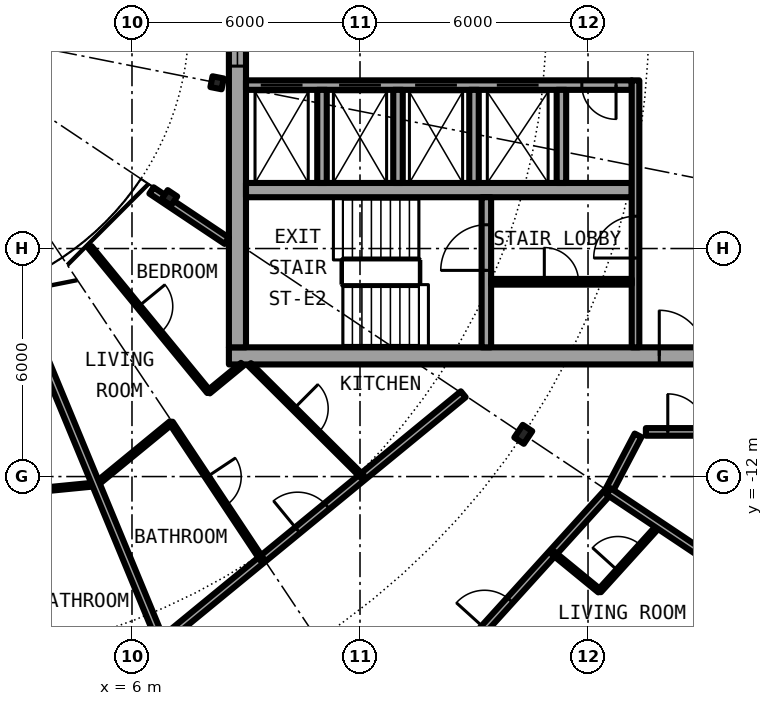
"""IFC4 building model, lengths in metres.
Left out: names, types, materials, properties, quantities, classifications, styles, units other than length and angle.
Written with IfcOpenShell. Run it as: python <this file> out.ifc"""

import sys

from ifc_helpers import new_model, si_unit, direction, frame, frame_2d, origin, origin_2d, place, context, subcontext, project, spatial, rectangle, i_section, extrude, element, fill, save


model = new_model("IFC4")
c1 = context("Model", 3, precision=1e-05, world=origin(), true_north=direction((0.0, 1.0)))
c2 = subcontext(c1, "Body", "Model", "MODEL_VIEW")
j1 = project(units=[si_unit("LENGTHUNIT", "METRE"), si_unit("PLANEANGLEUNIT", "RADIAN")], contexts=[c1])
p1 = place(None, origin())
s1 = spatial("IfcSite", under=j1, at=p1, CompositionType="ELEMENT")
p2 = place(p1, origin())
s2 = spatial("IfcBuilding", under=s1, at=p2, CompositionType="ELEMENT")
p3 = place(p2, frame((0.0, 0.0, 212.7)))
s3 = spatial("IfcBuildingStorey", under=s2, at=p3, CompositionType="ELEMENT", Elevation=212.7)
p4 = place(p3, frame((16.297, -10.889, 0.0), z_axis=(0.0, 0.0, 1.0), x_axis=(0.831469612303, -0.55557023302, 0.0)))
e1 = element("IfcColumn", 1, at=p4, inside=s3, PredefinedType="COLUMN", context=c2, shape_type="SweptSolid", body=[
    extrude(i_section(OverallWidth=0.3, OverallDepth=0.4, WebThickness=0.013, FlangeThickness=0.024, FilletRadius=0.027, at=origin_2d()), origin(), (0.0, 0.0, 1.0), 3.05),
])
for number, where, z_axis, x_axis in (
    (2, (6.984, -4.667, 0.0), (0.0, 0.0, 1.0), (0.831, -0.556, 0.0)),
    (3, (8.239, -1.639, 0.0), (0.0, 0.0, 1.0), (0.981, -0.195, 0.0)),
):
    element("IfcColumn", number, at=place(p3, frame(where, z_axis=z_axis, x_axis=x_axis)), inside=s3, PredefinedType="COLUMN", context=c2, shape_type="SweptSolid", body=[
        extrude(i_section(OverallWidth=0.3, OverallDepth=0.29, WebThickness=0.009, FlangeThickness=0.014, FilletRadius=0.027, at=origin_2d()), origin(), (0.0, 0.0, 1.0), 3.05),
    ])
p5 = place(p3, frame((19.304, -19.304, 0.0), z_axis=(0.0, 0.0, 1.0), x_axis=(0.634382322723, 0.773019449054, 0.0)))
e4 = element("IfcWall", 4, at=p5, inside=s3, PredefinedType="SOLIDWALL", context=c2, shape_type="SweptSolid", body=[
    extrude(rectangle(XDim=5.352, YDim=0.25, at=frame_2d((2.676, 0.0))), origin(), (0.0, 0.0, 1.0), 2.7),
])
p6 = place(p5, frame((0.841, 0.0, 0.0)))
e5 = element("IfcOpeningElement", 5, at=p6, cuts=e4, PredefinedType="OPENING", context=c2, shape_type="SweptSolid", body=[
    extrude(rectangle(XDim=1.0, YDim=2.2, at=frame_2d((0.5, 1.1))), frame((0.0, 0.135, 0.0), z_axis=(0.0, -1.0, 0.0), x_axis=(1.0, 0.0, 0.0)), (0.0, 0.0, 1.0), 0.27),
])
p7 = place(p5, frame((3.111, 0.0, 0.3)))
e6 = element("IfcOpeningElement", 6, at=p7, cuts=e4, PredefinedType="OPENING", context=c2, shape_type="SweptSolid", body=[
    extrude(rectangle(XDim=1.8, YDim=2.1, at=frame_2d((0.9, 1.05))), frame((0.0, 0.135, 0.0), z_axis=(0.0, -1.0, 0.0), x_axis=(1.0, 0.0, 0.0)), (0.0, 0.0, 1.0), 0.27),
])
p8 = place(p3, frame((8.55, -8.825, 0.0), z_axis=(0.0, 0.0, 1.0), x_axis=(1.0, 0.0, 0.0)))
e7 = element("IfcWall", 7, at=p8, inside=s3, PredefinedType="SHEAR", context=c2, shape_type="SweptSolid", body=[
    extrude(rectangle(XDim=13.5, YDim=0.45, at=frame_2d((6.75, 0.0))), origin(), (0.0, 0.0, 1.0), 3.05),
])
p9 = place(p8, frame((11.325, 0.0, 0.0)))
e8 = element("IfcOpeningElement", 8, at=p9, cuts=e7, PredefinedType="OPENING", context=c2, shape_type="SweptSolid", body=[
    extrude(rectangle(XDim=1.2, YDim=2.3, at=frame_2d((0.6, 1.15))), frame((0.0, 0.235, 0.0), z_axis=(0.0, -1.0, 0.0), x_axis=(1.0, 0.0, 0.0)), (0.0, 0.0, 1.0), 0.47),
])
p10 = place(p3, frame((8.775, -8.6, 0.0), z_axis=(0.0, 0.0, 1.0), x_axis=(0.0, 1.0, 0.0)))
e9 = element("IfcWall", 9, at=p10, inside=s3, PredefinedType="SHEAR", context=c2, shape_type="SweptSolid", body=[
    extrude(rectangle(XDim=17.2, YDim=0.45, at=frame_2d((8.6, 0.0))), origin(), (0.0, 0.0, 1.0), 3.05),
])
p11 = place(p10, frame((7.4, 0.0, 0.1)))
e10 = element("IfcOpeningElement", 10, at=p11, cuts=e9, PredefinedType="OPENING", context=c2, shape_type="SweptSolid", body=[
    extrude(rectangle(XDim=2.4, YDim=2.2, at=frame_2d((1.2, 1.1))), frame((0.0, 0.235, 0.0), z_axis=(0.0, -1.0, 0.0), x_axis=(1.0, 0.0, 0.0)), (0.0, 0.0, 1.0), 0.47),
])
p12 = place(p3, frame((19.15, -1.7, 0.0), z_axis=(0.0, 0.0, 1.0), x_axis=(-1.0, 0.0, 0.0)))
e11 = element("IfcWall", 11, at=p12, inside=s3, PredefinedType="SHEAR", context=c2, shape_type="SweptSolid", body=[
    extrude(rectangle(XDim=10.15, YDim=0.25, at=frame_2d((5.075, 0.0))), origin(), (0.0, 0.0, 1.0), 3.05),
])
p13 = place(p12, frame((8.663, 0.0, 0.0)))
e12 = element("IfcOpeningElement", 12, at=p13, cuts=e11, PredefinedType="OPENING", context=c2, shape_type="SweptSolid", body=[
    extrude(rectangle(XDim=1.1, YDim=2.3, at=frame_2d((0.55, 1.15))), frame((0.0, 0.135, 0.0), z_axis=(0.0, -1.0, 0.0), x_axis=(1.0, 0.0, 0.0)), (0.0, 0.0, 1.0), 0.27),
])
p14 = place(p12, frame((6.6, 0.0, 0.0)))
e13 = element("IfcOpeningElement", 13, at=p14, cuts=e11, PredefinedType="OPENING", context=c2, shape_type="SweptSolid", body=[
    extrude(rectangle(XDim=1.1, YDim=2.3, at=frame_2d((0.55, 1.15))), frame((0.0, 0.135, 0.0), z_axis=(0.0, -1.0, 0.0), x_axis=(1.0, 0.0, 0.0)), (0.0, 0.0, 1.0), 0.27),
])
p15 = place(p12, frame((4.6, 0.0, 0.0)))
e14 = element("IfcOpeningElement", 14, at=p15, cuts=e11, PredefinedType="OPENING", context=c2, shape_type="SweptSolid", body=[
    extrude(rectangle(XDim=1.1, YDim=2.3, at=frame_2d((0.55, 1.15))), frame((0.0, 0.135, 0.0), z_axis=(0.0, -1.0, 0.0), x_axis=(1.0, 0.0, 0.0)), (0.0, 0.0, 1.0), 0.27),
])
p16 = place(p12, frame((2.45, 0.0, 0.0)))
e15 = element("IfcOpeningElement", 15, at=p16, cuts=e11, PredefinedType="OPENING", context=c2, shape_type="SweptSolid", body=[
    extrude(rectangle(XDim=1.1, YDim=2.3, at=frame_2d((0.55, 1.15))), frame((0.0, 0.135, 0.0), z_axis=(0.0, -1.0, 0.0), x_axis=(1.0, 0.0, 0.0)), (0.0, 0.0, 1.0), 0.27),
])
p17 = place(p12, frame((0.413, 0.0, 0.0)))
e16 = element("IfcOpeningElement", 16, at=p17, cuts=e11, PredefinedType="OPENING", context=c2, shape_type="SweptSolid", body=[
    extrude(rectangle(XDim=0.9, YDim=2.3, at=frame_2d((0.45, 1.15))), frame((0.0, 0.135, 0.0), z_axis=(0.0, -1.0, 0.0), x_axis=(1.0, 0.0, 0.0)), (0.0, 0.0, 1.0), 0.27),
])
p18 = place(p3, frame((9.0, -4.462, 0.0), z_axis=(0.0, 0.0, 1.0), x_axis=(1.0, 0.0, 0.0)))
e17 = element("IfcWall", 17, at=p18, inside=s3, PredefinedType="SHEAR", context=c2, shape_type="SweptSolid", body=[
    extrude(rectangle(XDim=10.15, YDim=0.375, at=frame_2d((5.075, 0.0))), origin(), (0.0, 0.0, 1.0), 3.05),
])
p19 = place(p3, frame((15.325, -8.6, 0.0), z_axis=(0.0, 0.0, 1.0), x_axis=(0.0, 1.0, 0.0)))
e18 = element("IfcWall", 18, at=p19, inside=s3, PredefinedType="SHEAR", context=c2, shape_type="SweptSolid", body=[
    extrude(rectangle(XDim=3.95, YDim=0.25, at=frame_2d((1.975, 0.0))), origin(), (0.0, 0.0, 1.0), 3.05),
])
p20 = place(p19, frame((2.025, 0.0, 0.0)))
e19 = element("IfcOpeningElement", 19, at=p20, cuts=e18, PredefinedType="OPENING", context=c2, shape_type="SweptSolid", body=[
    extrude(rectangle(XDim=1.2, YDim=2.3, at=frame_2d((0.6, 1.15))), frame((0.0, 0.135, 0.0), z_axis=(0.0, -1.0, 0.0), x_axis=(1.0, 0.0, 0.0)), (0.0, 0.0, 1.0), 0.27),
])
for number, where, z_axis, x_axis in (
    (20, (15.0, -1.825, 0.0), (0.0, 0.0, 1.0), (0.0, -1.0, 0.0)),
    (21, (17.3, -1.825, 0.0), (0.0, 0.0, 1.0), (0.0, -1.0, 0.0)),
):
    element("IfcWall", number, at=place(p3, frame(where, z_axis=z_axis, x_axis=x_axis)), inside=s3, PredefinedType="SOLIDWALL", context=c2, shape_type="SweptSolid", body=[
        extrude(rectangle(XDim=2.45, YDim=0.25, at=frame_2d((1.225, 0.0))), origin(), (0.0, 0.0, 1.0), 2.7),
    ])
p21 = place(p3, frame((19.25, -8.6, 0.0), z_axis=(0.0, 0.0, 1.0), x_axis=(0.0, 1.0, 0.0)))
e22 = element("IfcWall", 22, at=p21, inside=s3, PredefinedType="SOLIDWALL", context=c2, shape_type="SweptSolid", body=[
    extrude(rectangle(XDim=7.025, YDim=0.2, at=frame_2d((3.513, 0.0))), origin(), (0.0, 0.0, 1.0), 2.7),
])
p22 = place(p21, frame((2.35, 0.0, 0.0)))
e23 = element("IfcOpeningElement", 23, at=p22, cuts=e22, PredefinedType="OPENING", context=c2, shape_type="SweptSolid", body=[
    extrude(rectangle(XDim=1.1, YDim=2.3, at=frame_2d((0.55, 1.15))), frame((0.0, 0.11, 0.0), z_axis=(0.0, -1.0, 0.0), x_axis=(1.0, 0.0, 0.0)), (0.0, 0.0, 1.0), 0.22),
])
for number, where, z_axis, x_axis in (
    (24, (11.0, -1.825, 0.0), (0.0, 0.0, 1.0), (0.0, -1.0, 0.0)),
    (25, (13.0, -1.825, 0.0), (0.0, 0.0, 1.0), (0.0, -1.0, 0.0)),
):
    element("IfcWall", number, at=place(p3, frame(where, z_axis=z_axis, x_axis=x_axis)), inside=s3, PredefinedType="SOLIDWALL", context=c2, shape_type="SweptSolid", body=[
        extrude(rectangle(XDim=2.45, YDim=0.25, at=frame_2d((1.225, 0.0))), origin(), (0.0, 0.0, 1.0), 2.7),
    ])
p23 = place(p3, frame((15.45, -6.875, 0.0), z_axis=(0.0, 0.0, 1.0), x_axis=(1.0, 0.0, 0.0)))
e26 = element("IfcWall", 26, at=p23, inside=s3, PredefinedType="PARTITIONING", context=c2, shape_type="SweptSolid", body=[
    extrude(rectangle(XDim=3.7, YDim=0.15, at=frame_2d((1.85, 0.0))), origin(), (0.0, 0.0, 1.0), 2.7),
])
p24 = place(p23, frame((1.4, 0.0, 0.0)))
e27 = element("IfcOpeningElement", 27, at=p24, cuts=e26, PredefinedType="OPENING", context=c2, shape_type="SweptSolid", body=[
    extrude(rectangle(XDim=0.9, YDim=2.3, at=frame_2d((0.45, 1.15))), frame((0.0, 0.085, 0.0), z_axis=(0.0, -1.0, 0.0), x_axis=(1.0, 0.0, 0.0)), (0.0, 0.0, 1.0), 0.17),
])
p25 = place(p3, frame((18.302, -15.01, 0.0), z_axis=(0.0, 0.0, 1.0), x_axis=(0.671637685376, 0.740879760544, 0.0)))
e28 = element("IfcWall", 28, at=p25, inside=s3, PredefinedType="PARTITIONING", context=c2, shape_type="SweptSolid", body=[
    extrude(rectangle(XDim=2.338, YDim=0.1, at=frame_2d((1.169, 0.0))), origin(), (0.0, 0.0, 1.0), 2.7),
])
p26 = place(p25, frame((0.719, 0.0, 0.0)))
e29 = element("IfcOpeningElement", 29, at=p26, cuts=e28, PredefinedType="OPENING", context=c2, shape_type="SweptSolid", body=[
    extrude(rectangle(XDim=0.9, YDim=2.3, at=frame_2d((0.45, 1.15))), frame((0.0, 0.06, 0.0), z_axis=(0.0, -1.0, 0.0), x_axis=(1.0, 0.0, 0.0)), (0.0, 0.0, 1.0), 0.12),
])
p27 = place(p3, frame((18.542, -12.389, 0.0), z_axis=(0.0, 0.0, 1.0), x_axis=(0.465359652486, 0.885121683068, 0.0)))
e30 = element("IfcWall", 30, at=p27, inside=s3, PredefinedType="PARTITIONING", context=c2, shape_type="SweptSolid", body=[
    extrude(rectangle(XDim=1.665, YDim=0.2, at=frame_2d((0.833, 0.0))), origin(), (0.0, 0.0, 1.0), 2.7),
])
p28 = place(p3, frame((14.147, -17.238, 0.0), z_axis=(0.0, 0.0, 1.0), x_axis=(0.671561669125, 0.740948665268, 0.0)))
e31 = element("IfcWall", 31, at=p28, inside=s3, PredefinedType="PARTITIONING", context=c2, shape_type="SweptSolid", body=[
    extrude(rectangle(XDim=6.544, YDim=0.2, at=frame_2d((3.272, 0.0))), origin(), (0.0, 0.0, 1.0), 2.7),
])
p29 = place(p28, frame((1.682, 0.0, 0.0)))
e32 = element("IfcOpeningElement", 32, at=p29, cuts=e31, PredefinedType="OPENING", context=c2, shape_type="SweptSolid", body=[
    extrude(rectangle(XDim=1.0, YDim=2.3, at=frame_2d((0.5, 1.15))), frame((0.0, 0.11, 0.0), z_axis=(0.0, -1.0, 0.0), x_axis=(1.0, 0.0, 0.0)), (0.0, 0.0, 1.0), 0.22),
])
p30 = place(p3, frame((6.773, -16.353, 0.0), z_axis=(0.0, 0.0, 1.0), x_axis=(0.773034536097, 0.634363938131, 0.0)))
e33 = element("IfcWall", 33, at=p30, inside=s3, PredefinedType="PARTITIONING", context=c2, shape_type="SweptSolid", body=[
    extrude(rectangle(XDim=10.277, YDim=0.2, at=frame_2d((5.138, 0.0))), origin(), (0.0, 0.0, 1.0), 2.7),
])
p31 = place(p30, frame((4.638, 0.0, 0.0)))
e34 = element("IfcOpeningElement", 34, at=p31, cuts=e33, PredefinedType="OPENING", context=c2, shape_type="SweptSolid", body=[
    extrude(rectangle(XDim=1.0, YDim=2.3, at=frame_2d((0.5, 1.15))), frame((0.0, 0.11, 0.0), z_axis=(0.0, -1.0, 0.0), x_axis=(1.0, 0.0, 0.0)), (0.0, 0.0, 1.0), 0.22),
])
p32 = place(p3, frame((2.511, -12.455, 0.0), z_axis=(0.0, 0.0, 1.0), x_axis=(0.995205948766, 0.09780142913, 0.0)))
e35 = element("IfcWall", 35, at=p32, inside=s3, PredefinedType="PARTITIONING", context=c2, shape_type="SweptSolid", body=[
    extrude(rectangle(XDim=2.556, YDim=0.1, at=frame_2d((1.278, 0.0))), origin(), (0.0, 0.0, 1.0), 2.7),
])
p33 = place(p3, frame((5.055, -12.204, 0.0), z_axis=(0.0, 0.0, 1.0), x_axis=(0.772943675046, 0.634474645046, 0.0)))
e36 = element("IfcWall", 36, at=p33, inside=s3, PredefinedType="PARTITIONING", context=c2, shape_type="SweptSolid", body=[
    extrude(rectangle(XDim=2.557, YDim=0.1, at=frame_2d((1.278, 0.0))), origin(), (0.0, 0.0, 1.0), 2.7),
])
p34 = place(p3, frame((8.017, -9.773, 0.0), z_axis=(0.0, 0.0, 1.0), x_axis=(0.772786083133, 0.634666581534, 0.0)))
e37 = element("IfcWall", 37, at=p34, inside=s3, PredefinedType="PARTITIONING", context=c2, shape_type="SweptSolid", body=[
    extrude(rectangle(XDim=1.144, YDim=0.1, at=frame_2d((0.572, 0.0))), origin(), (0.0, 0.0, 1.0), 2.7),
])
p35 = place(p3, frame((19.523, -10.825, 0.0), z_axis=(0.0, 0.0, 1.0), x_axis=(1.0, 0.0, 0.0)))
e38 = element("IfcWall", 38, at=p35, inside=s3, PredefinedType="PARTITIONING", context=c2, shape_type="SweptSolid", body=[
    extrude(rectangle(XDim=2.152, YDim=0.2, at=frame_2d((1.076, 0.0))), origin(), (0.0, 0.0, 1.0), 2.7),
])
p36 = place(p35, frame((0.576, 0.0, 0.0)))
e39 = element("IfcOpeningElement", 39, at=p36, cuts=e38, PredefinedType="OPENING", context=c2, shape_type="SweptSolid", body=[
    extrude(rectangle(XDim=1.0, YDim=2.3, at=frame_2d((0.5, 1.15))), frame((0.0, 0.11, 0.0), z_axis=(0.0, -1.0, 0.0), x_axis=(1.0, 0.0, 0.0)), (0.0, 0.0, 1.0), 0.22),
])
p37 = place(p3, frame((6.513, -4.472, 0.0), z_axis=(0.0, 0.0, 1.0), x_axis=(0.831403409976, -0.555669299026, 0.0)))
e40 = element("IfcWall", 40, at=p37, inside=s3, PredefinedType="PARTITIONING", context=c2, shape_type="SweptSolid", body=[
    extrude(rectangle(XDim=2.383, YDim=0.2, at=frame_2d((1.191, 0.0))), origin(), (0.0, 0.0, 1.0), 2.7),
])
p38 = place(p3, frame((17.077, -14.006, 0.0), z_axis=(0.0, 0.0, 1.0), x_axis=(0.773476341377, -0.633825172528, 0.0)))
e41 = element("IfcWall", 41, at=p38, inside=s3, PredefinedType="PARTITIONING", context=c2, shape_type="SweptSolid", body=[
    extrude(rectangle(XDim=1.584, YDim=0.1, at=frame_2d((0.792, 0.0))), origin(), (0.0, 0.0, 1.0), 2.7),
])
p39 = place(p3, frame((2.952, -7.133, 0.0), z_axis=(0.0, 0.0, 1.0), x_axis=(0.382570007985, -0.923926506271, 0.0)))
e42 = element("IfcWall", 42, at=p39, inside=s3, PredefinedType="PARTITIONING", context=c2, shape_type="SweptSolid", body=[
    extrude(rectangle(XDim=9.98, YDim=0.2, at=frame_2d((4.99, 0.0))), origin(), (0.0, 0.0, 1.0), 2.7),
])
p40 = place(p3, frame((4.898, -5.968, 0.0), z_axis=(0.0, 0.0, 1.0), x_axis=(0.634401778971, -0.773003481776, 0.0)))
e43 = element("IfcWall", 43, at=p40, inside=s3, PredefinedType="PARTITIONING", context=c2, shape_type="SweptSolid", body=[
    extrude(rectangle(XDim=4.92, YDim=0.1, at=frame_2d((2.46, 0.0))), origin(), (0.0, 0.0, 1.0), 2.7),
])
p41 = place(p40, frame((2.01, 0.0, 0.0)))
e44 = element("IfcOpeningElement", 44, at=p41, cuts=e43, PredefinedType="OPENING", context=c2, shape_type="SweptSolid", body=[
    extrude(rectangle(XDim=0.9, YDim=2.3, at=frame_2d((0.45, 1.15))), frame((0.0, 0.06, 0.0), z_axis=(0.0, -1.0, 0.0), x_axis=(1.0, 0.0, 0.0)), (0.0, 0.0, 1.0), 0.12),
])
p42 = place(p3, frame((7.028, -10.584, 0.0), z_axis=(0.0, 0.0, 1.0), x_axis=(0.553303732327, -0.832979579457, 0.0)))
e45 = element("IfcWall", 45, at=p42, inside=s3, PredefinedType="PARTITIONING", context=c2, shape_type="SweptSolid", body=[
    extrude(rectangle(XDim=4.319, YDim=0.1, at=frame_2d((2.16, 0.0))), origin(), (0.0, 0.0, 1.0), 2.7),
])
p43 = place(p42, frame((1.71, 0.0, 0.0)))
e46 = element("IfcOpeningElement", 46, at=p43, cuts=e45, PredefinedType="OPENING", context=c2, shape_type="SweptSolid", body=[
    extrude(rectangle(XDim=0.9, YDim=2.3, at=frame_2d((0.45, 1.15))), frame((0.0, 0.06, 0.0), z_axis=(0.0, -1.0, 0.0), x_axis=(1.0, 0.0, 0.0)), (0.0, 0.0, 1.0), 0.12),
])
p44 = place(p3, frame((9.096, -9.051, 0.0), z_axis=(0.0, 0.0, 1.0), x_axis=(0.708909651863, -0.705299302067, 0.0)))
e47 = element("IfcWall", 47, at=p44, inside=s3, PredefinedType="PARTITIONING", context=c2, shape_type="SweptSolid", body=[
    extrude(rectangle(XDim=4.193, YDim=0.1, at=frame_2d((2.096, 0.0))), origin(), (0.0, 0.0, 1.0), 2.7),
])
p45 = place(p44, frame((1.646, 0.0, 0.0)))
e48 = element("IfcOpeningElement", 48, at=p45, cuts=e47, PredefinedType="OPENING", context=c2, shape_type="SweptSolid", body=[
    extrude(rectangle(XDim=0.9, YDim=2.3, at=frame_2d((0.45, 1.15))), frame((0.0, 0.06, 0.0), z_axis=(0.0, -1.0, 0.0), x_axis=(1.0, 0.0, 0.0)), (0.0, 0.0, 1.0), 0.12),
])
p46 = place(p3, frame((18.542, -12.389, 0.0), z_axis=(0.0, 0.0, 1.0), x_axis=(0.831387096605, -0.55569370664, 0.0)))
e49 = element("IfcWall", 49, at=p46, inside=s3, PredefinedType="PARTITIONING", context=c2, shape_type="SweptSolid", body=[
    extrude(rectangle(XDim=4.875, YDim=0.2, at=frame_2d((2.438, 0.0))), origin(), (0.0, 0.0, 1.0), 2.7),
])
p47 = place(p13, origin())
e50 = element("IfcDoor", 50, at=p47, inside=s3, OperationType="DOUBLE_DOOR_SLIDING", PredefinedType="DOOR", context=c2, shape_type="SweptSolid", body=[
    extrude(rectangle(XDim=1.1, YDim=2.3, at=frame_2d((0.55, 1.15))), frame((0.0, 0.025, 0.0), z_axis=(0.0, -1.0, 0.0), x_axis=(1.0, 0.0, 0.0)), (0.0, 0.0, 1.0), 0.05),
])
fill(e12, e50)
p48 = place(p14, origin())
e51 = element("IfcDoor", 51, at=p48, inside=s3, OperationType="DOUBLE_DOOR_SLIDING", PredefinedType="DOOR", context=c2, shape_type="SweptSolid", body=[
    extrude(rectangle(XDim=1.1, YDim=2.3, at=frame_2d((0.55, 1.15))), frame((0.0, 0.025, 0.0), z_axis=(0.0, -1.0, 0.0), x_axis=(1.0, 0.0, 0.0)), (0.0, 0.0, 1.0), 0.05),
])
fill(e13, e51)
p49 = place(p15, origin())
e52 = element("IfcDoor", 52, at=p49, inside=s3, OperationType="DOUBLE_DOOR_SLIDING", PredefinedType="DOOR", context=c2, shape_type="SweptSolid", body=[
    extrude(rectangle(XDim=1.1, YDim=2.3, at=frame_2d((0.55, 1.15))), frame((0.0, 0.025, 0.0), z_axis=(0.0, -1.0, 0.0), x_axis=(1.0, 0.0, 0.0)), (0.0, 0.0, 1.0), 0.05),
])
fill(e14, e52)
p50 = place(p16, origin())
e53 = element("IfcDoor", 53, at=p50, inside=s3, OperationType="DOUBLE_DOOR_SLIDING", PredefinedType="DOOR", context=c2, shape_type="SweptSolid", body=[
    extrude(rectangle(XDim=1.1, YDim=2.3, at=frame_2d((0.55, 1.15))), frame((0.0, 0.025, 0.0), z_axis=(0.0, -1.0, 0.0), x_axis=(1.0, 0.0, 0.0)), (0.0, 0.0, 1.0), 0.05),
])
fill(e15, e53)
p51 = place(p17, origin())
e54 = element("IfcDoor", 54, at=p51, inside=s3, OperationType="SINGLE_SWING_RIGHT", PredefinedType="DOOR", context=c2, shape_type="SweptSolid", body=[
    extrude(rectangle(XDim=0.9, YDim=2.3, at=frame_2d((0.45, 1.15))), frame((0.0, 0.025, 0.0), z_axis=(0.0, -1.0, 0.0), x_axis=(1.0, 0.0, 0.0)), (0.0, 0.0, 1.0), 0.05),
])
fill(e16, e54)
p52 = place(p24, origin())
e55 = element("IfcDoor", 55, at=p52, inside=s3, OperationType="SINGLE_SWING_LEFT", PredefinedType="DOOR", context=c2, shape_type="SweptSolid", body=[
    extrude(rectangle(XDim=0.9, YDim=2.3, at=frame_2d((0.45, 1.15))), frame((0.0, 0.025, 0.0), z_axis=(0.0, -1.0, 0.0), x_axis=(1.0, 0.0, 0.0)), (0.0, 0.0, 1.0), 0.05),
])
fill(e27, e55)
p53 = place(p20, origin())
e56 = element("IfcDoor", 56, at=p53, inside=s3, OperationType="SINGLE_SWING_LEFT", PredefinedType="DOOR", context=c2, shape_type="SweptSolid", body=[
    extrude(rectangle(XDim=1.2, YDim=2.3, at=frame_2d((0.6, 1.15))), frame((0.0, 0.025, 0.0), z_axis=(0.0, -1.0, 0.0), x_axis=(1.0, 0.0, 0.0)), (0.0, 0.0, 1.0), 0.05),
])
fill(e19, e56)
p54 = place(p22, origin())
e57 = element("IfcDoor", 57, at=p54, inside=s3, OperationType="SINGLE_SWING_RIGHT", PredefinedType="DOOR", context=c2, shape_type="SweptSolid", body=[
    extrude(rectangle(XDim=1.1, YDim=2.3, at=frame_2d((0.55, 1.15))), frame((0.0, 0.025, 0.0), z_axis=(0.0, -1.0, 0.0), x_axis=(1.0, 0.0, 0.0)), (0.0, 0.0, 1.0), 0.05),
])
fill(e23, e57)
p55 = place(p9, origin())
e58 = element("IfcDoor", 58, at=p55, inside=s3, OperationType="SINGLE_SWING_LEFT", PredefinedType="DOOR", context=c2, shape_type="SweptSolid", body=[
    extrude(rectangle(XDim=1.2, YDim=2.3, at=frame_2d((0.6, 1.15))), frame((0.0, 0.025, 0.0), z_axis=(0.0, -1.0, 0.0), x_axis=(1.0, 0.0, 0.0)), (0.0, 0.0, 1.0), 0.05),
])
fill(e8, e58)
p56 = place(p11, origin())
e59 = element("IfcWindow", 59, at=p56, inside=s3, PartitioningType="SINGLE_PANEL", PredefinedType="WINDOW", context=c2, shape_type="SweptSolid", body=[
    extrude(rectangle(XDim=2.4, YDim=2.2, at=frame_2d((1.2, 1.1))), frame((0.0, 0.03, 0.0), z_axis=(0.0, -1.0, 0.0), x_axis=(1.0, 0.0, 0.0)), (0.0, 0.0, 1.0), 0.06),
])
fill(e10, e59)
p57 = place(p29, origin())
e60 = element("IfcDoor", 60, at=p57, inside=s3, OperationType="SINGLE_SWING_LEFT", PredefinedType="DOOR", context=c2, shape_type="SweptSolid", body=[
    extrude(rectangle(XDim=1.0, YDim=2.3, at=frame_2d((0.5, 1.15))), frame((0.0, 0.025, 0.0), z_axis=(0.0, -1.0, 0.0), x_axis=(1.0, 0.0, 0.0)), (0.0, 0.0, 1.0), 0.05),
])
fill(e32, e60)
p58 = place(p26, origin())
e61 = element("IfcDoor", 61, at=p58, inside=s3, OperationType="SINGLE_SWING_LEFT", PredefinedType="DOOR", context=c2, shape_type="SweptSolid", body=[
    extrude(rectangle(XDim=0.9, YDim=2.3, at=frame_2d((0.45, 1.15))), frame((0.0, 0.025, 0.0), z_axis=(0.0, -1.0, 0.0), x_axis=(1.0, 0.0, 0.0)), (0.0, 0.0, 1.0), 0.05),
])
fill(e29, e61)
p59 = place(p31, origin())
e62 = element("IfcDoor", 62, at=p59, inside=s3, OperationType="SINGLE_SWING_RIGHT", PredefinedType="DOOR", context=c2, shape_type="SweptSolid", body=[
    extrude(rectangle(XDim=1.0, YDim=2.3, at=frame_2d((0.5, 1.15))), frame((0.0, 0.025, 0.0), z_axis=(0.0, -1.0, 0.0), x_axis=(1.0, 0.0, 0.0)), (0.0, 0.0, 1.0), 0.05),
])
fill(e34, e62)
p60 = place(p43, origin())
e63 = element("IfcDoor", 63, at=p60, inside=s3, OperationType="SINGLE_SWING_LEFT", PredefinedType="DOOR", context=c2, shape_type="SweptSolid", body=[
    extrude(rectangle(XDim=0.9, YDim=2.3, at=frame_2d((0.45, 1.15))), frame((0.0, 0.025, 0.0), z_axis=(0.0, -1.0, 0.0), x_axis=(1.0, 0.0, 0.0)), (0.0, 0.0, 1.0), 0.05),
])
fill(e46, e63)
p61 = place(p45, origin())
e64 = element("IfcDoor", 64, at=p61, inside=s3, OperationType="SINGLE_SWING_RIGHT", PredefinedType="DOOR", context=c2, shape_type="SweptSolid", body=[
    extrude(rectangle(XDim=0.9, YDim=2.3, at=frame_2d((0.45, 1.15))), frame((0.0, 0.025, 0.0), z_axis=(0.0, -1.0, 0.0), x_axis=(1.0, 0.0, 0.0)), (0.0, 0.0, 1.0), 0.05),
])
fill(e48, e64)
p62 = place(p41, origin())
e65 = element("IfcDoor", 65, at=p62, inside=s3, OperationType="SINGLE_SWING_RIGHT", PredefinedType="DOOR", context=c2, shape_type="SweptSolid", body=[
    extrude(rectangle(XDim=0.9, YDim=2.3, at=frame_2d((0.45, 1.15))), frame((0.0, 0.025, 0.0), z_axis=(0.0, -1.0, 0.0), x_axis=(1.0, 0.0, 0.0)), (0.0, 0.0, 1.0), 0.05),
])
fill(e44, e65)
p63 = place(p36, origin())
e66 = element("IfcDoor", 66, at=p63, inside=s3, OperationType="SINGLE_SWING_LEFT", PredefinedType="DOOR", context=c2, shape_type="SweptSolid", body=[
    extrude(rectangle(XDim=1.0, YDim=2.3, at=frame_2d((0.5, 1.15))), frame((0.0, 0.025, 0.0), z_axis=(0.0, -1.0, 0.0), x_axis=(1.0, 0.0, 0.0)), (0.0, 0.0, 1.0), 0.05),
])
fill(e39, e66)
save(model, sys.argv[1])
